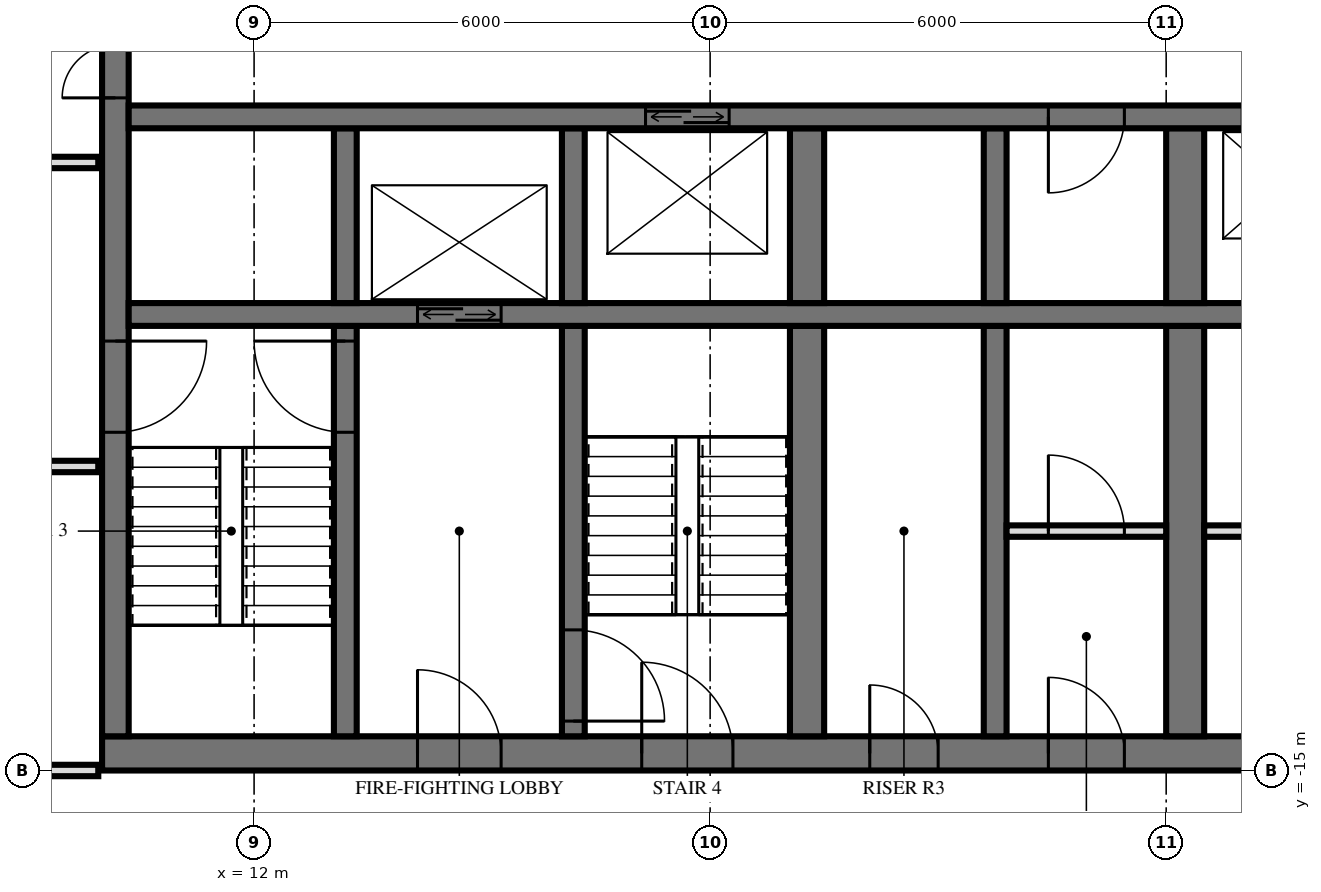
"""IFC4 building model, lengths in metres.
Left out: names, types, materials, properties, quantities, classifications, styles, units other than length and angle.
Written with IfcOpenShell. Run it as: python <this file> out.ifc"""

import sys

from ifc_helpers import new_model, si_unit, direction, frame, frame_2d, origin, place, context, subcontext, project, spatial, rectangle, extrude, element, fill, save


model = new_model("IFC4")
c1 = context("Model", 3, precision=1e-05, world=origin(), true_north=direction((0.0, 1.0)))
c2 = subcontext(c1, "Body", "Model", "MODEL_VIEW")
j1 = project(units=[si_unit("LENGTHUNIT", "METRE"), si_unit("PLANEANGLEUNIT", "RADIAN")], contexts=[c1])
p1 = place(None, origin())
s1 = spatial("IfcSite", under=j1, at=p1, CompositionType="ELEMENT")
p2 = place(p1, origin())
s2 = spatial("IfcBuilding", under=s1, at=p2, CompositionType="ELEMENT")
p3 = place(p2, frame((0.0, 0.0, 63.6)))
s3 = spatial("IfcBuildingStorey", under=s2, at=p3, CompositionType="ELEMENT", Elevation=63.6)
p4 = place(p3, frame((10.0, -14.775, 0.0), z_axis=(0.0, 0.0, 1.0), x_axis=(1.0, 0.0, 0.0)))
e1 = element("IfcWall", 1, at=p4, inside=s3, PredefinedType="SHEAR", context=c2, shape_type="SweptSolid", body=[
    extrude(rectangle(XDim=19.5, YDim=0.45, at=frame_2d((9.75, 0.0))), origin(), (0.0, 0.0, 1.0), 3.6),
])
p5 = place(p4, frame((7.1, 0.0, 0.0)))
e2 = element("IfcOpeningElement", 2, at=p5, cuts=e1, PredefinedType="OPENING", context=c2, shape_type="SweptSolid", body=[
    extrude(rectangle(XDim=1.2, YDim=2.1, at=frame_2d((0.6, 1.05))), frame((0.0, 0.235, 0.0), z_axis=(0.0, -1.0, 0.0), x_axis=(1.0, 0.0, 0.0)), (0.0, 0.0, 1.0), 0.47),
])
p6 = place(p4, frame((4.15, 0.0, 0.0)))
e3 = element("IfcOpeningElement", 3, at=p6, cuts=e1, PredefinedType="OPENING", context=c2, shape_type="SweptSolid", body=[
    extrude(rectangle(XDim=1.1, YDim=2.1, at=frame_2d((0.55, 1.05))), frame((0.0, 0.235, 0.0), z_axis=(0.0, -1.0, 0.0), x_axis=(1.0, 0.0, 0.0)), (0.0, 0.0, 1.0), 0.47),
])
p7 = place(p4, frame((10.1, 0.0, 0.0)))
e4 = element("IfcOpeningElement", 4, at=p7, cuts=e1, PredefinedType="OPENING", context=c2, shape_type="SweptSolid", body=[
    extrude(rectangle(XDim=0.9, YDim=2.1, at=frame_2d((0.45, 1.05))), frame((0.0, 0.235, 0.0), z_axis=(0.0, -1.0, 0.0), x_axis=(1.0, 0.0, 0.0)), (0.0, 0.0, 1.0), 0.47),
])
p8 = place(p4, frame((12.45, 0.0, 0.0)))
e5 = element("IfcOpeningElement", 5, at=p8, cuts=e1, PredefinedType="OPENING", context=c2, shape_type="SweptSolid", body=[
    extrude(rectangle(XDim=1.0, YDim=2.1, at=frame_2d((0.5, 1.05))), frame((0.0, 0.235, 0.0), z_axis=(0.0, -1.0, 0.0), x_axis=(1.0, 0.0, 0.0)), (0.0, 0.0, 1.0), 0.47),
])
p9 = place(p4, frame((16.25, 0.0, 0.0)))
e6 = element("IfcOpeningElement", 6, at=p9, cuts=e1, PredefinedType="OPENING", context=c2, shape_type="SweptSolid", body=[
    extrude(rectangle(XDim=1.0, YDim=2.1, at=frame_2d((0.5, 1.05))), frame((0.0, 0.235, 0.0), z_axis=(0.0, -1.0, 0.0), x_axis=(1.0, 0.0, 0.0)), (0.0, 0.0, 1.0), 0.47),
])
p10 = place(p3, frame((10.175, -14.55, 0.0), z_axis=(0.0, 0.0, 1.0), x_axis=(0.0, 1.0, 0.0)))
e7 = element("IfcWall", 7, at=p10, inside=s3, PredefinedType="SHEAR", context=c2, shape_type="SweptSolid", body=[
    extrude(rectangle(XDim=14.1, YDim=0.35, at=frame_2d((7.05, 0.0))), origin(), (0.0, 0.0, 1.0), 3.6),
])
p11 = place(p10, frame((8.4, 0.0, 0.0)))
e8 = element("IfcOpeningElement", 8, at=p11, cuts=e7, PredefinedType="OPENING", context=c2, shape_type="SweptSolid", body=[
    extrude(rectangle(XDim=1.4, YDim=2.4, at=frame_2d((0.7, 1.2))), frame((0.0, 0.185, 0.0), z_axis=(0.0, -1.0, 0.0), x_axis=(1.0, 0.0, 0.0)), (0.0, 0.0, 1.0), 0.37),
])
p12 = place(p10, frame((10.0, 0.0, 0.0)))
e9 = element("IfcOpeningElement", 9, at=p12, cuts=e7, PredefinedType="OPENING", context=c2, shape_type="SweptSolid", body=[
    extrude(rectangle(XDim=1.4, YDim=2.4, at=frame_2d((0.7, 1.2))), frame((0.0, 0.185, 0.0), z_axis=(0.0, -1.0, 0.0), x_axis=(1.0, 0.0, 0.0)), (0.0, 0.0, 1.0), 0.37),
])
p13 = place(p10, frame((4.0, 0.0, 0.0)))
e10 = element("IfcOpeningElement", 10, at=p13, cuts=e7, PredefinedType="OPENING", context=c2, shape_type="SweptSolid", body=[
    extrude(rectangle(XDim=1.2, YDim=2.1, at=frame_2d((0.6, 1.05))), frame((0.0, 0.185, 0.0), z_axis=(0.0, -1.0, 0.0), x_axis=(1.0, 0.0, 0.0)), (0.0, 0.0, 1.0), 0.37),
])
p14 = place(p3, frame((10.35, -6.4, 0.0), z_axis=(0.0, 0.0, 1.0), x_axis=(1.0, 0.0, 0.0)))
e11 = element("IfcWall", 11, at=p14, inside=s3, PredefinedType="SHEAR", context=c2, shape_type="SweptSolid", body=[
    extrude(rectangle(XDim=18.7, YDim=0.3, at=frame_2d((9.35, 0.0))), origin(), (0.0, 0.0, 1.0), 3.6),
])
p15 = place(p14, frame((14.65, 0.0, 0.0)))
e12 = element("IfcOpeningElement", 12, at=p15, cuts=e11, PredefinedType="OPENING", context=c2, shape_type="SweptSolid", body=[
    extrude(rectangle(XDim=1.1, YDim=2.1, at=frame_2d((0.55, 1.05))), frame((0.0, 0.16, 0.0), z_axis=(0.0, -1.0, 0.0), x_axis=(1.0, 0.0, 0.0)), (0.0, 0.0, 1.0), 0.32),
])
p16 = place(p14, frame((17.05, 0.0, 0.0)))
e13 = element("IfcOpeningElement", 13, at=p16, cuts=e11, PredefinedType="OPENING", context=c2, shape_type="SweptSolid", body=[
    extrude(rectangle(XDim=1.1, YDim=2.1, at=frame_2d((0.55, 1.05))), frame((0.0, 0.16, 0.0), z_axis=(0.0, -1.0, 0.0), x_axis=(1.0, 0.0, 0.0)), (0.0, 0.0, 1.0), 0.32),
])
p17 = place(p14, frame((6.8, 0.0, 0.0)))
e14 = element("IfcOpeningElement", 14, at=p17, cuts=e11, PredefinedType="OPENING", context=c2, shape_type="SweptSolid", body=[
    extrude(rectangle(XDim=1.1, YDim=2.1, at=frame_2d((0.55, 1.05))), frame((0.0, 0.16, 0.0), z_axis=(0.0, -1.0, 0.0), x_axis=(1.0, 0.0, 0.0)), (0.0, 0.0, 1.0), 0.32),
])
p18 = place(p14, frame((12.1, 0.0, 0.0)))
e15 = element("IfcOpeningElement", 15, at=p18, cuts=e11, PredefinedType="OPENING", context=c2, shape_type="SweptSolid", body=[
    extrude(rectangle(XDim=1.0, YDim=2.1, at=frame_2d((0.5, 1.05))), frame((0.0, 0.16, 0.0), z_axis=(0.0, -1.0, 0.0), x_axis=(1.0, 0.0, 0.0)), (0.0, 0.0, 1.0), 0.32),
])
p19 = place(p3, frame((10.35, -9.0, 0.0), z_axis=(0.0, 0.0, 1.0), x_axis=(1.0, 0.0, 0.0)))
e16 = element("IfcWall", 16, at=p19, inside=s3, PredefinedType="SHEAR", context=c2, shape_type="SweptSolid", body=[
    extrude(rectangle(XDim=18.7, YDim=0.3, at=frame_2d((9.35, 0.0))), origin(), (0.0, 0.0, 1.0), 3.6),
])
p20 = place(p19, frame((3.8, 0.0, 0.0)))
e17 = element("IfcOpeningElement", 17, at=p20, cuts=e16, PredefinedType="OPENING", context=c2, shape_type="SweptSolid", body=[
    extrude(rectangle(XDim=1.1, YDim=2.1, at=frame_2d((0.55, 1.05))), frame((0.0, 0.16, 0.0), z_axis=(0.0, -1.0, 0.0), x_axis=(1.0, 0.0, 0.0)), (0.0, 0.0, 1.0), 0.32),
])
p21 = place(p3, frame((13.2, -8.85, 0.0), z_axis=(0.0, 0.0, 1.0), x_axis=(0.0, 1.0, 0.0)))
e18 = element("IfcWall", 18, at=p21, inside=s3, PredefinedType="SHEAR", context=c2, shape_type="SweptSolid", body=[
    extrude(rectangle(XDim=2.3, YDim=0.3, at=frame_2d((1.15, 0.0))), origin(), (0.0, 0.0, 1.0), 3.6),
])
p22 = place(p3, frame((13.2, -14.55, 0.0), z_axis=(0.0, 0.0, 1.0), x_axis=(0.0, 1.0, 0.0)))
e19 = element("IfcWall", 19, at=p22, inside=s3, PredefinedType="SHEAR", context=c2, shape_type="SweptSolid", body=[
    extrude(rectangle(XDim=5.4, YDim=0.3, at=frame_2d((2.7, 0.0))), origin(), (0.0, 0.0, 1.0), 3.6),
])
p23 = place(p22, frame((4.0, 0.0, 0.0)))
e20 = element("IfcOpeningElement", 20, at=p23, cuts=e19, PredefinedType="OPENING", context=c2, shape_type="SweptSolid", body=[
    extrude(rectangle(XDim=1.2, YDim=2.1, at=frame_2d((0.6, 1.05))), frame((0.0, 0.16, 0.0), z_axis=(0.0, -1.0, 0.0), x_axis=(1.0, 0.0, 0.0)), (0.0, 0.0, 1.0), 0.32),
])
p24 = place(p3, frame((16.2, -8.85, 0.0), z_axis=(0.0, 0.0, 1.0), x_axis=(0.0, 1.0, 0.0)))
e21 = element("IfcWall", 21, at=p24, inside=s3, PredefinedType="SHEAR", context=c2, shape_type="SweptSolid", body=[
    extrude(rectangle(XDim=2.3, YDim=0.3, at=frame_2d((1.15, 0.0))), origin(), (0.0, 0.0, 1.0), 3.6),
])
p25 = place(p3, frame((16.2, -14.55, 0.0), z_axis=(0.0, 0.0, 1.0), x_axis=(0.0, 1.0, 0.0)))
e22 = element("IfcWall", 22, at=p25, inside=s3, PredefinedType="SHEAR", context=c2, shape_type="SweptSolid", body=[
    extrude(rectangle(XDim=5.4, YDim=0.3, at=frame_2d((2.7, 0.0))), origin(), (0.0, 0.0, 1.0), 3.6),
])
p26 = place(p25, frame((0.2, 0.0, 0.0)))
e23 = element("IfcOpeningElement", 23, at=p26, cuts=e22, PredefinedType="OPENING", context=c2, shape_type="SweptSolid", body=[
    extrude(rectangle(XDim=1.2, YDim=2.1, at=frame_2d((0.6, 1.05))), frame((0.0, 0.16, 0.0), z_axis=(0.0, -1.0, 0.0), x_axis=(1.0, 0.0, 0.0)), (0.0, 0.0, 1.0), 0.32),
])
p27 = place(p3, frame((19.275, -8.85, 0.0), z_axis=(0.0, 0.0, 1.0), x_axis=(0.0, 1.0, 0.0)))
e24 = element("IfcWall", 24, at=p27, inside=s3, PredefinedType="SHEAR", context=c2, shape_type="SweptSolid", body=[
    extrude(rectangle(XDim=2.3, YDim=0.45, at=frame_2d((1.15, 0.0))), origin(), (0.0, 0.0, 1.0), 3.6),
])
p28 = place(p3, frame((19.275, -14.55, 0.0), z_axis=(0.0, 0.0, 1.0), x_axis=(0.0, 1.0, 0.0)))
e25 = element("IfcWall", 25, at=p28, inside=s3, PredefinedType="SHEAR", context=c2, shape_type="SweptSolid", body=[
    extrude(rectangle(XDim=5.4, YDim=0.45, at=frame_2d((2.7, 0.0))), origin(), (0.0, 0.0, 1.0), 3.6),
])
p29 = place(p3, frame((21.75, -8.85, 0.0), z_axis=(0.0, 0.0, 1.0), x_axis=(0.0, 1.0, 0.0)))
e26 = element("IfcWall", 26, at=p29, inside=s3, PredefinedType="SHEAR", context=c2, shape_type="SweptSolid", body=[
    extrude(rectangle(XDim=2.3, YDim=0.3, at=frame_2d((1.15, 0.0))), origin(), (0.0, 0.0, 1.0), 3.6),
])
p30 = place(p3, frame((21.75, -14.55, 0.0), z_axis=(0.0, 0.0, 1.0), x_axis=(0.0, 1.0, 0.0)))
e27 = element("IfcWall", 27, at=p30, inside=s3, PredefinedType="SHEAR", context=c2, shape_type="SweptSolid", body=[
    extrude(rectangle(XDim=5.4, YDim=0.3, at=frame_2d((2.7, 0.0))), origin(), (0.0, 0.0, 1.0), 3.6),
])
p31 = place(p3, frame((24.25, -8.85, 0.0), z_axis=(0.0, 0.0, 1.0), x_axis=(0.0, 1.0, 0.0)))
e28 = element("IfcWall", 28, at=p31, inside=s3, PredefinedType="SHEAR", context=c2, shape_type="SweptSolid", body=[
    extrude(rectangle(XDim=2.3, YDim=0.5, at=frame_2d((1.15, 0.0))), origin(), (0.0, 0.0, 1.0), 3.6),
])
p32 = place(p3, frame((24.25, -14.55, 0.0), z_axis=(0.0, 0.0, 1.0), x_axis=(0.0, 1.0, 0.0)))
e29 = element("IfcWall", 29, at=p32, inside=s3, PredefinedType="SHEAR", context=c2, shape_type="SweptSolid", body=[
    extrude(rectangle(XDim=5.4, YDim=0.5, at=frame_2d((2.7, 0.0))), origin(), (0.0, 0.0, 1.0), 3.6),
])
p33 = place(p3, frame((21.9, -11.85, 0.0), z_axis=(0.0, 0.0, 1.0), x_axis=(1.0, 0.0, 0.0)))
e30 = element("IfcWall", 30, at=p33, inside=s3, PredefinedType="PARTITIONING", context=c2, shape_type="SweptSolid", body=[
    extrude(rectangle(XDim=2.1, YDim=0.15, at=frame_2d((1.05, 0.0))), origin(), (0.0, 0.0, 1.0), 3.3),
])
p34 = place(p33, frame((0.55, 0.0, 0.0)))
e31 = element("IfcOpeningElement", 31, at=p34, cuts=e30, PredefinedType="OPENING", context=c2, shape_type="SweptSolid", body=[
    extrude(rectangle(XDim=1.0, YDim=2.1, at=frame_2d((0.5, 1.05))), frame((0.0, 0.085, 0.0), z_axis=(0.0, -1.0, 0.0), x_axis=(1.0, 0.0, 0.0)), (0.0, 0.0, 1.0), 0.17),
])
p35 = place(p3, frame((24.5, -11.85, 0.0), z_axis=(0.0, 0.0, 1.0), x_axis=(1.0, 0.0, 0.0)))
e32 = element("IfcWall", 32, at=p35, inside=s3, PredefinedType="PARTITIONING", context=c2, shape_type="SweptSolid", body=[
    extrude(rectangle(XDim=4.5, YDim=0.15, at=frame_2d((2.25, 0.0))), origin(), (0.0, 0.0, 1.0), 3.3),
])
p36 = place(p35, frame((1.75, 0.0, 0.0)))
e33 = element("IfcOpeningElement", 33, at=p36, cuts=e32, PredefinedType="OPENING", context=c2, shape_type="SweptSolid", body=[
    extrude(rectangle(XDim=1.0, YDim=2.1, at=frame_2d((0.5, 1.05))), frame((0.0, 0.085, 0.0), z_axis=(0.0, -1.0, 0.0), x_axis=(1.0, 0.0, 0.0)), (0.0, 0.0, 1.0), 0.17),
])
p37 = place(p3, frame((-9.95, -15.0, 0.0), z_axis=(0.0, 0.0, 1.0), x_axis=(1.0, 0.0, 0.0)))
e34 = element("IfcWall", 34, at=p37, inside=s3, PredefinedType="PARTITIONING", context=c2, shape_type="SweptSolid", body=[
    extrude(rectangle(XDim=19.9, YDim=0.15, at=frame_2d((9.95, 0.0))), origin(), (0.0, 0.0, 1.0), 2.684),
])
p38 = place(p37, frame((9.45, 0.0, 0.0)))
e35 = element("IfcOpeningElement", 35, at=p38, cuts=e34, PredefinedType="OPENING", context=c2, shape_type="SweptSolid", body=[
    extrude(rectangle(XDim=1.0, YDim=2.1, at=frame_2d((0.5, 1.05))), frame((0.0, 0.085, 0.0), z_axis=(0.0, -1.0, 0.0), x_axis=(1.0, 0.0, 0.0)), (0.0, 0.0, 1.0), 0.17),
])
p39 = place(p3, frame((-9.95, -11.0, 0.0), z_axis=(0.0, 0.0, 1.0), x_axis=(1.0, 0.0, 0.0)))
e36 = element("IfcWall", 36, at=p39, inside=s3, PredefinedType="PARTITIONING", context=c2, shape_type="SweptSolid", body=[
    extrude(rectangle(XDim=19.9, YDim=0.15, at=frame_2d((9.95, 0.0))), origin(), (0.0, 0.0, 1.0), 3.32),
])
p40 = place(p39, frame((9.45, 0.0, 0.0)))
e37 = element("IfcOpeningElement", 37, at=p40, cuts=e36, PredefinedType="OPENING", context=c2, shape_type="SweptSolid", body=[
    extrude(rectangle(XDim=1.0, YDim=2.1, at=frame_2d((0.5, 1.05))), frame((0.0, 0.085, 0.0), z_axis=(0.0, -1.0, 0.0), x_axis=(1.0, 0.0, 0.0)), (0.0, 0.0, 1.0), 0.17),
])
p41 = place(p39, frame((3.45, 0.0, 0.0)))
e38 = element("IfcOpeningElement", 38, at=p41, cuts=e36, PredefinedType="OPENING", context=c2, shape_type="SweptSolid", body=[
    extrude(rectangle(XDim=1.0, YDim=2.1, at=frame_2d((0.5, 1.05))), frame((0.0, 0.085, 0.0), z_axis=(0.0, -1.0, 0.0), x_axis=(1.0, 0.0, 0.0)), (0.0, 0.0, 1.0), 0.17),
])
p42 = place(p3, frame((-9.95, -7.0, 0.0), z_axis=(0.0, 0.0, 1.0), x_axis=(1.0, 0.0, 0.0)))
e39 = element("IfcWall", 39, at=p42, inside=s3, PredefinedType="PARTITIONING", context=c2, shape_type="SweptSolid", body=[
    extrude(rectangle(XDim=19.9, YDim=0.15, at=frame_2d((9.95, 0.0))), origin(), (0.0, 0.0, 1.0), 3.32),
])
p43 = place(p42, frame((9.45, 0.0, 0.0)))
e40 = element("IfcOpeningElement", 40, at=p43, cuts=e39, PredefinedType="OPENING", context=c2, shape_type="SweptSolid", body=[
    extrude(rectangle(XDim=1.0, YDim=2.1, at=frame_2d((0.5, 1.05))), frame((0.0, 0.085, 0.0), z_axis=(0.0, -1.0, 0.0), x_axis=(1.0, 0.0, 0.0)), (0.0, 0.0, 1.0), 0.17),
])
p44 = place(p42, frame((15.45, 0.0, 0.0)))
e41 = element("IfcOpeningElement", 41, at=p44, cuts=e39, PredefinedType="OPENING", context=c2, shape_type="SweptSolid", body=[
    extrude(rectangle(XDim=1.0, YDim=2.1, at=frame_2d((0.5, 1.05))), frame((0.0, 0.085, 0.0), z_axis=(0.0, -1.0, 0.0), x_axis=(1.0, 0.0, 0.0)), (0.0, 0.0, 1.0), 0.17),
])
p45 = place(p20, origin())
e42 = element("IfcDoor", 42, at=p45, inside=s3, OperationType="DOUBLE_DOOR_SLIDING", PredefinedType="USERDEFINED", context=c2, shape_type="SweptSolid", body=[
    extrude(rectangle(XDim=1.1, YDim=2.1, at=frame_2d((0.55, 1.05))), frame((0.0, 0.025, 0.0), z_axis=(0.0, -1.0, 0.0), x_axis=(1.0, 0.0, 0.0)), (0.0, 0.0, 1.0), 0.05),
])
fill(e17, e42)
p46 = place(p17, origin())
e43 = element("IfcDoor", 43, at=p46, inside=s3, OperationType="DOUBLE_DOOR_SLIDING", PredefinedType="USERDEFINED", context=c2, shape_type="SweptSolid", body=[
    extrude(rectangle(XDim=1.1, YDim=2.1, at=frame_2d((0.55, 1.05))), frame((0.0, 0.025, 0.0), z_axis=(0.0, -1.0, 0.0), x_axis=(1.0, 0.0, 0.0)), (0.0, 0.0, 1.0), 0.05),
])
fill(e14, e43)
p47 = place(p11, origin())
e44 = element("IfcDoor", 44, at=p47, inside=s3, OperationType="DOUBLE_DOOR_SINGLE_SWING", PredefinedType="DOOR", context=c2, shape_type="SweptSolid", body=[
    extrude(rectangle(XDim=1.4, YDim=2.4, at=frame_2d((0.7, 1.2))), frame((0.0, 0.025, 0.0), z_axis=(0.0, -1.0, 0.0), x_axis=(1.0, 0.0, 0.0)), (0.0, 0.0, 1.0), 0.05),
])
fill(e8, e44)
p48 = place(p13, frame((0.6, 0.0, 0.0), z_axis=(0.0, 0.0, 1.0), x_axis=(-1.0, 0.0, 0.0)))
e45 = element("IfcDoor", 45, at=p48, inside=s3, OperationType="SINGLE_SWING_RIGHT", PredefinedType="DOOR", context=c2, shape_type="SweptSolid", body=[
    extrude(rectangle(XDim=1.2, YDim=2.1, at=frame_2d((0.0, 1.05))), frame((0.0, -0.025, 0.0), z_axis=(0.0, 1.0, 0.0), x_axis=(-1.0, 0.0, 0.0)), (0.0, 0.0, 1.0), 0.05),
])
fill(e10, e45)
p49 = place(p5, origin())
e46 = element("IfcDoor", 46, at=p49, inside=s3, OperationType="SINGLE_SWING_RIGHT", PredefinedType="DOOR", context=c2, shape_type="SweptSolid", body=[
    extrude(rectangle(XDim=1.2, YDim=2.1, at=frame_2d((0.6, 1.05))), frame((0.0, 0.025, 0.0), z_axis=(0.0, -1.0, 0.0), x_axis=(1.0, 0.0, 0.0)), (0.0, 0.0, 1.0), 0.05),
])
fill(e2, e46)
p50 = place(p6, origin())
e47 = element("IfcDoor", 47, at=p50, inside=s3, OperationType="SINGLE_SWING_RIGHT", PredefinedType="DOOR", context=c2, shape_type="SweptSolid", body=[
    extrude(rectangle(XDim=1.1, YDim=2.1, at=frame_2d((0.55, 1.05))), frame((0.0, 0.025, 0.0), z_axis=(0.0, -1.0, 0.0), x_axis=(1.0, 0.0, 0.0)), (0.0, 0.0, 1.0), 0.05),
])
fill(e3, e47)
p51 = place(p7, origin())
e48 = element("IfcDoor", 48, at=p51, inside=s3, OperationType="SINGLE_SWING_RIGHT", PredefinedType="DOOR", context=c2, shape_type="SweptSolid", body=[
    extrude(rectangle(XDim=0.9, YDim=2.1, at=frame_2d((0.45, 1.05))), frame((0.0, 0.025, 0.0), z_axis=(0.0, -1.0, 0.0), x_axis=(1.0, 0.0, 0.0)), (0.0, 0.0, 1.0), 0.05),
])
fill(e4, e48)
p52 = place(p8, origin())
e49 = element("IfcDoor", 49, at=p52, inside=s3, OperationType="SINGLE_SWING_RIGHT", PredefinedType="DOOR", context=c2, shape_type="SweptSolid", body=[
    extrude(rectangle(XDim=1.0, YDim=2.1, at=frame_2d((0.5, 1.05))), frame((0.0, 0.025, 0.0), z_axis=(0.0, -1.0, 0.0), x_axis=(1.0, 0.0, 0.0)), (0.0, 0.0, 1.0), 0.05),
])
fill(e5, e49)
p53 = place(p18, frame((0.5, 0.0, 0.0), z_axis=(0.0, 0.0, 1.0), x_axis=(-1.0, 0.0, 0.0)))
e50 = element("IfcDoor", 50, at=p53, inside=s3, OperationType="SINGLE_SWING_LEFT", PredefinedType="DOOR", context=c2, shape_type="SweptSolid", body=[
    extrude(rectangle(XDim=1.0, YDim=2.1, at=frame_2d((0.0, 1.05))), frame((0.0, -0.025, 0.0), z_axis=(0.0, 1.0, 0.0), x_axis=(-1.0, 0.0, 0.0)), (0.0, 0.0, 1.0), 0.05),
])
fill(e15, e50)
p54 = place(p23, origin())
e51 = element("IfcDoor", 51, at=p54, inside=s3, OperationType="SINGLE_SWING_LEFT", PredefinedType="DOOR", context=c2, shape_type="SweptSolid", body=[
    extrude(rectangle(XDim=1.2, YDim=2.1, at=frame_2d((0.6, 1.05))), frame((0.0, 0.025, 0.0), z_axis=(0.0, -1.0, 0.0), x_axis=(1.0, 0.0, 0.0)), (0.0, 0.0, 1.0), 0.05),
])
fill(e20, e51)
p55 = place(p26, frame((0.6, 0.0, 0.0), z_axis=(0.0, 0.0, 1.0), x_axis=(-1.0, 0.0, 0.0)))
e52 = element("IfcDoor", 52, at=p55, inside=s3, OperationType="SINGLE_SWING_LEFT", PredefinedType="DOOR", context=c2, shape_type="SweptSolid", body=[
    extrude(rectangle(XDim=1.2, YDim=2.1, at=frame_2d((0.0, 1.05))), frame((0.0, -0.025, 0.0), z_axis=(0.0, 1.0, 0.0), x_axis=(-1.0, 0.0, 0.0)), (0.0, 0.0, 1.0), 0.05),
])
fill(e23, e52)
p56 = place(p34, origin())
e53 = element("IfcDoor", 53, at=p56, inside=s3, OperationType="SINGLE_SWING_RIGHT", PredefinedType="DOOR", context=c2, shape_type="SweptSolid", body=[
    extrude(rectangle(XDim=1.0, YDim=2.1, at=frame_2d((0.5, 1.05))), frame((0.0, 0.025, 0.0), z_axis=(0.0, -1.0, 0.0), x_axis=(1.0, 0.0, 0.0)), (0.0, 0.0, 1.0), 0.05),
])
fill(e31, e53)
save(model, sys.argv[1])
